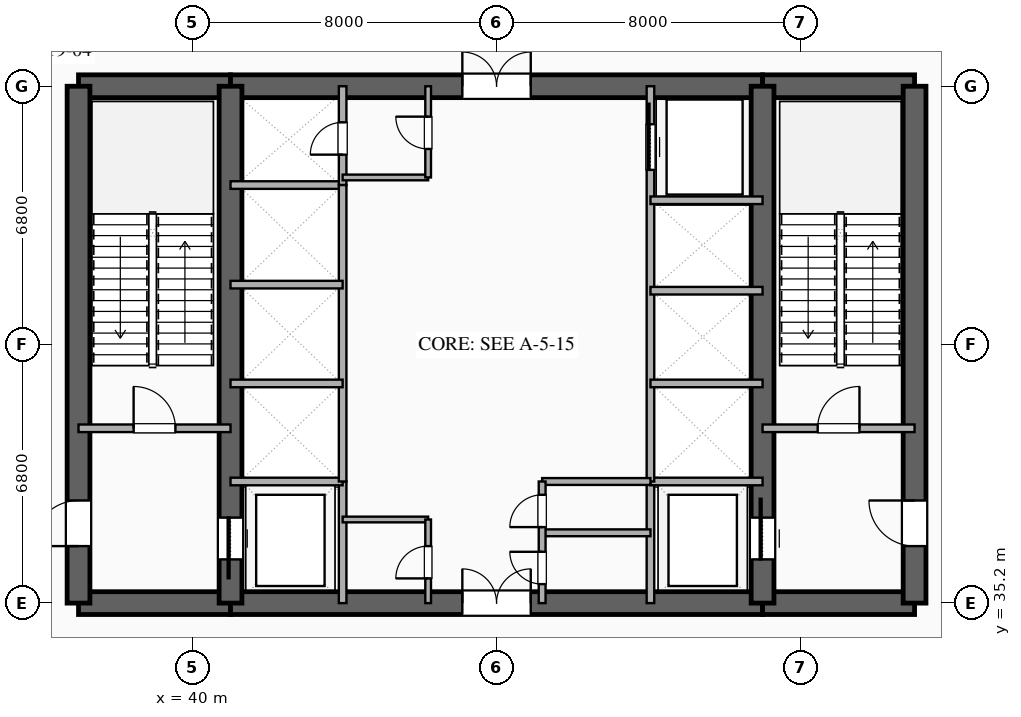
"""IFC4 building model, lengths in metres.
Left out: names, types, materials, properties, quantities, classifications, styles, units other than length and angle.
Written with IfcOpenShell. Run it as: python <this file> out.ifc"""

import sys

from ifc_helpers import new_model, si_unit, direction, frame, frame_2d, origin, place, context, subcontext, project, spatial, rectangle, extrude, element, fill, save


model = new_model("IFC4")
c1 = context("Model", 3, precision=1e-05, world=origin(), true_north=direction((0.0, 1.0)))
c2 = subcontext(c1, "Body", "Model", "MODEL_VIEW")
j1 = project(units=[si_unit("LENGTHUNIT", "METRE"), si_unit("PLANEANGLEUNIT", "RADIAN")], contexts=[c1])
p1 = place(None, origin())
s1 = spatial("IfcSite", under=j1, at=p1, CompositionType="ELEMENT")
p2 = place(p1, origin())
s2 = spatial("IfcBuilding", under=s1, at=p2, CompositionType="ELEMENT")
p3 = place(p2, frame((0.0, 0.0, 78.6)))
s3 = spatial("IfcBuildingStorey", under=s2, at=p3, CompositionType="ELEMENT", Elevation=78.6)
p4 = place(p3, frame((37.0, 35.2, 0.0), z_axis=(0.0, 0.0, 1.0), x_axis=(1.0, 0.0, 0.0)))
e1 = element("IfcWall", 1, at=p4, inside=s3, PredefinedType="SHEAR", context=c2, shape_type="SweptSolid", body=[
    extrude(rectangle(XDim=4.0, YDim=0.6, at=frame_2d((2.0, 0.0))), origin(), (0.0, 0.0, 1.0), 5.15),
])
p5 = place(p3, frame((41.0, 35.2, 0.0), z_axis=(0.0, 0.0, 1.0), x_axis=(1.0, 0.0, 0.0)))
e2 = element("IfcWall", 2, at=p5, inside=s3, PredefinedType="SHEAR", context=c2, shape_type="SweptSolid", body=[
    extrude(rectangle(XDim=14.0, YDim=0.6, at=frame_2d((7.0, 0.0))), origin(), (0.0, 0.0, 1.0), 5.15),
])
p6 = place(p5, frame((6.1, 0.0, 0.0)))
e3 = element("IfcOpeningElement", 3, at=p6, cuts=e2, PredefinedType="OPENING", context=c2, shape_type="SweptSolid", body=[
    extrude(rectangle(XDim=1.8, YDim=2.25, at=frame_2d((0.9, 1.125))), frame((0.0, 0.31, 0.0), z_axis=(0.0, -1.0, 0.0), x_axis=(1.0, 0.0, 0.0)), (0.0, 0.0, 1.0), 0.62),
])
for number, where, z_axis, x_axis in (
    (4, (55.0, 35.2, 0.0), (0.0, 0.0, 1.0), (1.0, 0.0, 0.0)),
    (5, (37.0, 48.8, 0.0), (0.0, 0.0, 1.0), (1.0, 0.0, 0.0)),
):
    element("IfcWall", number, at=place(p3, frame(where, z_axis=z_axis, x_axis=x_axis)), inside=s3, PredefinedType="SHEAR", context=c2, shape_type="SweptSolid", body=[
        extrude(rectangle(XDim=4.0, YDim=0.6, at=frame_2d((2.0, 0.0))), origin(), (0.0, 0.0, 1.0), 5.15),
    ])
p7 = place(p3, frame((41.0, 48.8, 0.0), z_axis=(0.0, 0.0, 1.0), x_axis=(1.0, 0.0, 0.0)))
e6 = element("IfcWall", 6, at=p7, inside=s3, PredefinedType="SHEAR", context=c2, shape_type="SweptSolid", body=[
    extrude(rectangle(XDim=14.0, YDim=0.6, at=frame_2d((7.0, 0.0))), origin(), (0.0, 0.0, 1.0), 5.15),
])
p8 = place(p7, frame((6.1, 0.0, 0.0)))
e7 = element("IfcOpeningElement", 7, at=p8, cuts=e6, PredefinedType="OPENING", context=c2, shape_type="SweptSolid", body=[
    extrude(rectangle(XDim=1.8, YDim=2.25, at=frame_2d((0.9, 1.125))), frame((0.0, 0.31, 0.0), z_axis=(0.0, -1.0, 0.0), x_axis=(1.0, 0.0, 0.0)), (0.0, 0.0, 1.0), 0.62),
])
p9 = place(p3, frame((55.0, 48.8, 0.0), z_axis=(0.0, 0.0, 1.0), x_axis=(1.0, 0.0, 0.0)))
e8 = element("IfcWall", 8, at=p9, inside=s3, PredefinedType="SHEAR", context=c2, shape_type="SweptSolid", body=[
    extrude(rectangle(XDim=4.0, YDim=0.6, at=frame_2d((2.0, 0.0))), origin(), (0.0, 0.0, 1.0), 5.15),
])
p10 = place(p3, frame((37.0, 35.2, 0.0), z_axis=(0.0, 0.0, 1.0), x_axis=(0.0, 1.0, 0.0)))
e9 = element("IfcWall", 9, at=p10, inside=s3, PredefinedType="SHEAR", context=c2, shape_type="SweptSolid", body=[
    extrude(rectangle(XDim=13.6, YDim=0.6, at=frame_2d((6.8, 0.0))), origin(), (0.0, 0.0, 1.0), 5.15),
])
p11 = place(p10, frame((1.5, 0.0, 0.0)))
e10 = element("IfcOpeningElement", 10, at=p11, cuts=e9, PredefinedType="OPENING", context=c2, shape_type="SweptSolid", body=[
    extrude(rectangle(XDim=1.2, YDim=2.15, at=frame_2d((0.6, 1.075))), frame((0.0, 0.31, 0.0), z_axis=(0.0, -1.0, 0.0), x_axis=(1.0, 0.0, 0.0)), (0.0, 0.0, 1.0), 0.62),
])
p12 = place(p3, frame((59.0, 35.2, 0.0), z_axis=(0.0, 0.0, 1.0), x_axis=(0.0, 1.0, 0.0)))
e11 = element("IfcWall", 11, at=p12, inside=s3, PredefinedType="SHEAR", context=c2, shape_type="SweptSolid", body=[
    extrude(rectangle(XDim=13.6, YDim=0.6, at=frame_2d((6.8, 0.0))), origin(), (0.0, 0.0, 1.0), 5.15),
])
p13 = place(p12, frame((1.5, 0.0, 0.0)))
e12 = element("IfcOpeningElement", 12, at=p13, cuts=e11, PredefinedType="OPENING", context=c2, shape_type="SweptSolid", body=[
    extrude(rectangle(XDim=1.2, YDim=2.15, at=frame_2d((0.6, 1.075))), frame((0.0, 0.31, 0.0), z_axis=(0.0, -1.0, 0.0), x_axis=(1.0, 0.0, 0.0)), (0.0, 0.0, 1.0), 0.62),
])
p14 = place(p3, frame((41.0, 35.2, 0.0), z_axis=(0.0, 0.0, 1.0), x_axis=(0.0, 1.0, 0.0)))
e13 = element("IfcWall", 13, at=p14, inside=s3, PredefinedType="SHEAR", context=c2, shape_type="SweptSolid", body=[
    extrude(rectangle(XDim=13.6, YDim=0.6, at=frame_2d((6.8, 0.0))), origin(), (0.0, 0.0, 1.0), 5.15),
])
p15 = place(p14, frame((1.15, 0.0, 0.0)))
e14 = element("IfcOpeningElement", 14, at=p15, cuts=e13, PredefinedType="OPENING", context=c2, shape_type="SweptSolid", body=[
    extrude(rectangle(XDim=1.1, YDim=2.2, at=frame_2d((0.55, 1.1))), frame((0.0, 0.31, 0.0), z_axis=(0.0, -1.0, 0.0), x_axis=(1.0, 0.0, 0.0)), (0.0, 0.0, 1.0), 0.62),
])
p16 = place(p3, frame((55.0, 35.2, 0.0), z_axis=(0.0, 0.0, 1.0), x_axis=(0.0, 1.0, 0.0)))
e15 = element("IfcWall", 15, at=p16, inside=s3, PredefinedType="SHEAR", context=c2, shape_type="SweptSolid", body=[
    extrude(rectangle(XDim=13.6, YDim=0.6, at=frame_2d((6.8, 0.0))), origin(), (0.0, 0.0, 1.0), 5.15),
])
p17 = place(p16, frame((1.15, 0.0, 0.0)))
e16 = element("IfcOpeningElement", 16, at=p17, cuts=e15, PredefinedType="OPENING", context=c2, shape_type="SweptSolid", body=[
    extrude(rectangle(XDim=1.1, YDim=2.2, at=frame_2d((0.55, 1.1))), frame((0.0, 0.31, 0.0), z_axis=(0.0, -1.0, 0.0), x_axis=(1.0, 0.0, 0.0)), (0.0, 0.0, 1.0), 0.62),
])
p18 = place(p3, frame((37.0, 39.8, 0.0), z_axis=(0.0, 0.0, 1.0), x_axis=(1.0, 0.0, 0.0)))
e17 = element("IfcWall", 17, at=p18, inside=s3, PredefinedType="SOLIDWALL", context=c2, shape_type="SweptSolid", body=[
    extrude(rectangle(XDim=4.0, YDim=0.2, at=frame_2d((2.0, 0.0))), origin(), (0.0, 0.0, 1.0), 3.45),
])
p19 = place(p18, frame((1.45, 0.0, 0.0)))
e18 = element("IfcOpeningElement", 18, at=p19, cuts=e17, PredefinedType="OPENING", context=c2, shape_type="SweptSolid", body=[
    extrude(rectangle(XDim=1.1, YDim=2.15, at=frame_2d((0.55, 1.075))), frame((0.0, 0.11, 0.0), z_axis=(0.0, -1.0, 0.0), x_axis=(1.0, 0.0, 0.0)), (0.0, 0.0, 1.0), 0.22),
])
p20 = place(p3, frame((55.0, 39.8, 0.0), z_axis=(0.0, 0.0, 1.0), x_axis=(1.0, 0.0, 0.0)))
e19 = element("IfcWall", 19, at=p20, inside=s3, PredefinedType="SOLIDWALL", context=c2, shape_type="SweptSolid", body=[
    extrude(rectangle(XDim=4.0, YDim=0.2, at=frame_2d((2.0, 0.0))), origin(), (0.0, 0.0, 1.0), 3.45),
])
p21 = place(p20, frame((1.45, 0.0, 0.0)))
e20 = element("IfcOpeningElement", 20, at=p21, cuts=e19, PredefinedType="OPENING", context=c2, shape_type="SweptSolid", body=[
    extrude(rectangle(XDim=1.1, YDim=2.15, at=frame_2d((0.55, 1.075))), frame((0.0, 0.11, 0.0), z_axis=(0.0, -1.0, 0.0), x_axis=(1.0, 0.0, 0.0)), (0.0, 0.0, 1.0), 0.22),
])
p22 = place(p3, frame((43.95, 35.2, 0.0), z_axis=(0.0, 0.0, 1.0), x_axis=(0.0, 1.0, 0.0)))
e21 = element("IfcWall", 21, at=p22, inside=s3, PredefinedType="SOLIDWALL", context=c2, shape_type="SweptSolid", body=[
    extrude(rectangle(XDim=3.2, YDim=0.2, at=frame_2d((1.6, 0.0))), origin(), (0.0, 0.0, 1.0), 3.45),
])
p23 = place(p3, frame((41.0, 38.4, 0.0), z_axis=(0.0, 0.0, 1.0), x_axis=(1.0, 0.0, 0.0)))
e22 = element("IfcWall", 22, at=p23, inside=s3, PredefinedType="SOLIDWALL", context=c2, shape_type="SweptSolid", body=[
    extrude(rectangle(XDim=2.95, YDim=0.2, at=frame_2d((1.475, 0.0))), origin(), (0.0, 0.0, 1.0), 3.45),
])
p24 = place(p3, frame((52.05, 35.2, 0.0), z_axis=(0.0, 0.0, 1.0), x_axis=(0.0, 1.0, 0.0)))
e23 = element("IfcWall", 23, at=p24, inside=s3, PredefinedType="SOLIDWALL", context=c2, shape_type="SweptSolid", body=[
    extrude(rectangle(XDim=3.2, YDim=0.2, at=frame_2d((1.6, 0.0))), origin(), (0.0, 0.0, 1.0), 3.45),
])
for number, where, z_axis, x_axis in (
    (24, (52.05, 38.4, 0.0), (0.0, 0.0, 1.0), (1.0, 0.0, 0.0)),
    (25, (41.0, 46.2, 0.0), (0.0, 0.0, 1.0), (1.0, 0.0, 0.0)),
):
    element("IfcWall", number, at=place(p3, frame(where, z_axis=z_axis, x_axis=x_axis)), inside=s3, PredefinedType="SOLIDWALL", context=c2, shape_type="SweptSolid", body=[
        extrude(rectangle(XDim=2.95, YDim=0.2, at=frame_2d((1.475, 0.0))), origin(), (0.0, 0.0, 1.0), 3.45),
    ])
p25 = place(p3, frame((43.95, 46.2, 0.0), z_axis=(0.0, 0.0, 1.0), x_axis=(0.0, 1.0, 0.0)))
e26 = element("IfcWall", 26, at=p25, inside=s3, PredefinedType="SOLIDWALL", context=c2, shape_type="SweptSolid", body=[
    extrude(rectangle(XDim=2.6, YDim=0.2, at=frame_2d((1.3, 0.0))), origin(), (0.0, 0.0, 1.0), 3.45),
])
p26 = place(p25, frame((0.8, 0.0, 0.0)))
e27 = element("IfcOpeningElement", 27, at=p26, cuts=e26, PredefinedType="OPENING", context=c2, shape_type="SweptSolid", body=[
    extrude(rectangle(XDim=0.85, YDim=2.15, at=frame_2d((0.425, 1.075))), frame((0.0, 0.11, 0.0), z_axis=(0.0, -1.0, 0.0), x_axis=(1.0, 0.0, 0.0)), (0.0, 0.0, 1.0), 0.22),
])
p27 = place(p3, frame((43.95, 38.4, 0.0), z_axis=(0.0, 0.0, 1.0), x_axis=(0.0, 1.0, 0.0)))
e28 = element("IfcWall", 28, at=p27, inside=s3, PredefinedType="SOLIDWALL", context=c2, shape_type="SweptSolid", body=[
    extrude(rectangle(XDim=7.8, YDim=0.2, at=frame_2d((3.9, 0.0))), origin(), (0.0, 0.0, 1.0), 3.45),
])
for number, where, z_axis, x_axis in (
    (29, (41.0, 40.98, 0.0), (0.0, 0.0, 1.0), (1.0, 0.0, 0.0)),
    (30, (41.0, 43.58, 0.0), (0.0, 0.0, 1.0), (1.0, 0.0, 0.0)),
):
    element("IfcWall", number, at=place(p3, frame(where, z_axis=z_axis, x_axis=x_axis)), inside=s3, PredefinedType="SOLIDWALL", context=c2, shape_type="SweptSolid", body=[
        extrude(rectangle(XDim=2.95, YDim=0.2, at=frame_2d((1.475, 0.0))), origin(), (0.0, 0.0, 1.0), 3.45),
    ])
p28 = place(p3, frame((52.05, 38.4, 0.0), z_axis=(0.0, 0.0, 1.0), x_axis=(0.0, 1.0, 0.0)))
e31 = element("IfcWall", 31, at=p28, inside=s3, PredefinedType="SOLIDWALL", context=c2, shape_type="SweptSolid", body=[
    extrude(rectangle(XDim=10.4, YDim=0.2, at=frame_2d((5.2, 0.0))), origin(), (0.0, 0.0, 1.0), 3.45),
])
p29 = place(p28, frame((8.2, 0.0, 0.0)))
e32 = element("IfcOpeningElement", 32, at=p29, cuts=e31, PredefinedType="OPENING", context=c2, shape_type="SweptSolid", body=[
    extrude(rectangle(XDim=1.2, YDim=2.2, at=frame_2d((0.6, 1.1))), frame((0.0, 0.11, 0.0), z_axis=(0.0, -1.0, 0.0), x_axis=(1.0, 0.0, 0.0)), (0.0, 0.0, 1.0), 0.22),
])
for number, where, z_axis, x_axis in (
    (33, (52.05, 40.98, 0.0), (0.0, 0.0, 1.0), (1.0, 0.0, 0.0)),
    (34, (52.05, 43.42, 0.0), (0.0, 0.0, 1.0), (1.0, 0.0, 0.0)),
    (35, (52.05, 45.8, 0.0), (0.0, 0.0, 1.0), (1.0, 0.0, 0.0)),
):
    element("IfcWall", number, at=place(p3, frame(where, z_axis=z_axis, x_axis=x_axis)), inside=s3, PredefinedType="SOLIDWALL", context=c2, shape_type="SweptSolid", body=[
        extrude(rectangle(XDim=2.95, YDim=0.2, at=frame_2d((1.475, 0.0))), origin(), (0.0, 0.0, 1.0), 3.45),
    ])
p30 = place(p3, frame((43.95, 37.4, 0.0), z_axis=(0.0, 0.0, 1.0), x_axis=(1.0, 0.0, 0.0)))
e36 = element("IfcWall", 36, at=p30, inside=s3, PredefinedType="PARTITIONING", context=c2, shape_type="SweptSolid", body=[
    extrude(rectangle(XDim=2.25, YDim=0.15, at=frame_2d((1.125, 0.0))), origin(), (0.0, 0.0, 1.0), 3.45),
])
p31 = place(p3, frame((46.2, 35.2, 0.0), z_axis=(0.0, 0.0, 1.0), x_axis=(0.0, 1.0, 0.0)))
e37 = element("IfcWall", 37, at=p31, inside=s3, PredefinedType="PARTITIONING", context=c2, shape_type="SweptSolid", body=[
    extrude(rectangle(XDim=2.2, YDim=0.15, at=frame_2d((1.1, 0.0))), origin(), (0.0, 0.0, 1.0), 3.45),
])
p32 = place(p31, frame((0.65, 0.0, 0.0)))
e38 = element("IfcOpeningElement", 38, at=p32, cuts=e37, PredefinedType="OPENING", context=c2, shape_type="SweptSolid", body=[
    extrude(rectangle(XDim=0.85, YDim=2.15, at=frame_2d((0.425, 1.075))), frame((0.0, 0.085, 0.0), z_axis=(0.0, -1.0, 0.0), x_axis=(1.0, 0.0, 0.0)), (0.0, 0.0, 1.0), 0.17),
])
p33 = place(p3, frame((43.95, 46.4, 0.0), z_axis=(0.0, 0.0, 1.0), x_axis=(1.0, 0.0, 0.0)))
e39 = element("IfcWall", 39, at=p33, inside=s3, PredefinedType="PARTITIONING", context=c2, shape_type="SweptSolid", body=[
    extrude(rectangle(XDim=2.25, YDim=0.15, at=frame_2d((1.125, 0.0))), origin(), (0.0, 0.0, 1.0), 3.45),
])
p34 = place(p3, frame((46.2, 46.4, 0.0), z_axis=(0.0, 0.0, 1.0), x_axis=(0.0, 1.0, 0.0)))
e40 = element("IfcWall", 40, at=p34, inside=s3, PredefinedType="PARTITIONING", context=c2, shape_type="SweptSolid", body=[
    extrude(rectangle(XDim=2.4, YDim=0.15, at=frame_2d((1.2, 0.0))), origin(), (0.0, 0.0, 1.0), 3.45),
])
p35 = place(p34, frame((0.75, 0.0, 0.0)))
e41 = element("IfcOpeningElement", 41, at=p35, cuts=e40, PredefinedType="OPENING", context=c2, shape_type="SweptSolid", body=[
    extrude(rectangle(XDim=0.85, YDim=2.15, at=frame_2d((0.425, 1.075))), frame((0.0, 0.085, 0.0), z_axis=(0.0, -1.0, 0.0), x_axis=(1.0, 0.0, 0.0)), (0.0, 0.0, 1.0), 0.17),
])
for number, where, z_axis, x_axis in (
    (42, (49.2, 37.05, 0.0), (0.0, 0.0, 1.0), (1.0, 0.0, 0.0)),
    (43, (49.2, 38.4, 0.0), (0.0, 0.0, 1.0), (1.0, 0.0, 0.0)),
):
    element("IfcWall", number, at=place(p3, frame(where, z_axis=z_axis, x_axis=x_axis)), inside=s3, PredefinedType="PLUMBINGWALL", context=c2, shape_type="SweptSolid", body=[
        extrude(rectangle(XDim=2.85, YDim=0.18, at=frame_2d((1.425, 0.0))), origin(), (0.0, 0.0, 1.0), 3.45),
    ])
p36 = place(p3, frame((49.2, 35.2, 0.0), z_axis=(0.0, 0.0, 1.0), x_axis=(0.0, 1.0, 0.0)))
e44 = element("IfcWall", 44, at=p36, inside=s3, PredefinedType="PLUMBINGWALL", context=c2, shape_type="SweptSolid", body=[
    extrude(rectangle(XDim=3.2, YDim=0.18, at=frame_2d((1.6, 0.0))), origin(), (0.0, 0.0, 1.0), 3.45),
])
p37 = place(p36, frame((0.5, 0.0, 0.0)))
e45 = element("IfcOpeningElement", 45, at=p37, cuts=e44, PredefinedType="OPENING", context=c2, shape_type="SweptSolid", body=[
    extrude(rectangle(XDim=0.85, YDim=2.1, at=frame_2d((0.425, 1.05))), frame((0.0, 0.1, 0.0), z_axis=(0.0, -1.0, 0.0), x_axis=(1.0, 0.0, 0.0)), (0.0, 0.0, 1.0), 0.2),
])
p38 = place(p36, frame((2.0, 0.0, 0.0)))
e46 = element("IfcOpeningElement", 46, at=p38, cuts=e44, PredefinedType="OPENING", context=c2, shape_type="SweptSolid", body=[
    extrude(rectangle(XDim=0.85, YDim=2.15, at=frame_2d((0.425, 1.075))), frame((0.0, 0.1, 0.0), z_axis=(0.0, -1.0, 0.0), x_axis=(1.0, 0.0, 0.0)), (0.0, 0.0, 1.0), 0.2),
])
p39 = place(p15, origin())
e47 = element("IfcDoor", 47, at=p39, inside=s3, OperationType="SLIDING_TO_LEFT", PredefinedType="DOOR", context=c2, shape_type="SweptSolid", body=[
    extrude(rectangle(XDim=1.1, YDim=2.2, at=frame_2d((0.55, 1.1))), frame((0.0, 0.025, 0.0), z_axis=(0.0, -1.0, 0.0), x_axis=(1.0, 0.0, 0.0)), (0.0, 0.0, 1.0), 0.05),
])
fill(e14, e47)
p40 = place(p17, origin())
e48 = element("IfcDoor", 48, at=p40, inside=s3, OperationType="SLIDING_TO_RIGHT", PredefinedType="DOOR", context=c2, shape_type="SweptSolid", body=[
    extrude(rectangle(XDim=1.1, YDim=2.2, at=frame_2d((0.55, 1.1))), frame((0.0, 0.025, 0.0), z_axis=(0.0, -1.0, 0.0), x_axis=(1.0, 0.0, 0.0)), (0.0, 0.0, 1.0), 0.05),
])
fill(e16, e48)
p41 = place(p11, origin())
e49 = element("IfcDoor", 49, at=p41, inside=s3, OperationType="SINGLE_SWING_LEFT", PredefinedType="DOOR", context=c2, shape_type="SweptSolid", body=[
    extrude(rectangle(XDim=1.2, YDim=2.15, at=frame_2d((0.6, 1.075))), frame((0.0, 0.025, 0.0), z_axis=(0.0, -1.0, 0.0), x_axis=(1.0, 0.0, 0.0)), (0.0, 0.0, 1.0), 0.05),
])
fill(e10, e49)
p42 = place(p13, origin())
e50 = element("IfcDoor", 50, at=p42, inside=s3, OperationType="SINGLE_SWING_RIGHT", PredefinedType="DOOR", context=c2, shape_type="SweptSolid", body=[
    extrude(rectangle(XDim=1.2, YDim=2.15, at=frame_2d((0.6, 1.075))), frame((0.0, 0.025, 0.0), z_axis=(0.0, -1.0, 0.0), x_axis=(1.0, 0.0, 0.0)), (0.0, 0.0, 1.0), 0.05),
])
fill(e12, e50)
p43 = place(p6, origin())
e51 = element("IfcDoor", 51, at=p43, inside=s3, OperationType="DOUBLE_DOOR_SINGLE_SWING", PredefinedType="DOOR", context=c2, shape_type="SweptSolid", body=[
    extrude(rectangle(XDim=1.8, YDim=2.25, at=frame_2d((0.9, 1.125))), frame((0.0, 0.025, 0.0), z_axis=(0.0, -1.0, 0.0), x_axis=(1.0, 0.0, 0.0)), (0.0, 0.0, 1.0), 0.05),
])
fill(e3, e51)
p44 = place(p8, origin())
e52 = element("IfcDoor", 52, at=p44, inside=s3, OperationType="DOUBLE_DOOR_SINGLE_SWING", PredefinedType="DOOR", context=c2, shape_type="SweptSolid", body=[
    extrude(rectangle(XDim=1.8, YDim=2.25, at=frame_2d((0.9, 1.125))), frame((0.0, 0.025, 0.0), z_axis=(0.0, -1.0, 0.0), x_axis=(1.0, 0.0, 0.0)), (0.0, 0.0, 1.0), 0.05),
])
fill(e7, e52)
p45 = place(p19, origin())
e53 = element("IfcDoor", 53, at=p45, inside=s3, OperationType="SINGLE_SWING_LEFT", PredefinedType="DOOR", context=c2, shape_type="SweptSolid", body=[
    extrude(rectangle(XDim=1.1, YDim=2.15, at=frame_2d((0.55, 1.075))), frame((0.0, 0.025, 0.0), z_axis=(0.0, -1.0, 0.0), x_axis=(1.0, 0.0, 0.0)), (0.0, 0.0, 1.0), 0.05),
])
fill(e18, e53)
p46 = place(p21, origin())
e54 = element("IfcDoor", 54, at=p46, inside=s3, OperationType="SINGLE_SWING_RIGHT", PredefinedType="DOOR", context=c2, shape_type="SweptSolid", body=[
    extrude(rectangle(XDim=1.1, YDim=2.15, at=frame_2d((0.55, 1.075))), frame((0.0, 0.025, 0.0), z_axis=(0.0, -1.0, 0.0), x_axis=(1.0, 0.0, 0.0)), (0.0, 0.0, 1.0), 0.05),
])
fill(e20, e54)
p47 = place(p26, origin())
e55 = element("IfcDoor", 55, at=p47, inside=s3, OperationType="SINGLE_SWING_LEFT", PredefinedType="DOOR", context=c2, shape_type="SweptSolid", body=[
    extrude(rectangle(XDim=0.85, YDim=2.15, at=frame_2d((0.425, 1.075))), frame((0.0, 0.025, 0.0), z_axis=(0.0, -1.0, 0.0), x_axis=(1.0, 0.0, 0.0)), (0.0, 0.0, 1.0), 0.05),
])
fill(e27, e55)
p48 = place(p29, origin())
e56 = element("IfcDoor", 56, at=p48, inside=s3, OperationType="SLIDING_TO_RIGHT", PredefinedType="DOOR", context=c2, shape_type="SweptSolid", body=[
    extrude(rectangle(XDim=1.2, YDim=2.2, at=frame_2d((0.6, 1.1))), frame((0.0, 0.025, 0.0), z_axis=(0.0, -1.0, 0.0), x_axis=(1.0, 0.0, 0.0)), (0.0, 0.0, 1.0), 0.05),
])
fill(e32, e56)
p49 = place(p32, origin())
e57 = element("IfcDoor", 57, at=p49, inside=s3, OperationType="SINGLE_SWING_LEFT", PredefinedType="DOOR", context=c2, shape_type="SweptSolid", body=[
    extrude(rectangle(XDim=0.85, YDim=2.15, at=frame_2d((0.425, 1.075))), frame((0.0, 0.025, 0.0), z_axis=(0.0, -1.0, 0.0), x_axis=(1.0, 0.0, 0.0)), (0.0, 0.0, 1.0), 0.05),
])
fill(e38, e57)
p50 = place(p35, origin())
e58 = element("IfcDoor", 58, at=p50, inside=s3, OperationType="SINGLE_SWING_RIGHT", PredefinedType="DOOR", context=c2, shape_type="SweptSolid", body=[
    extrude(rectangle(XDim=0.85, YDim=2.15, at=frame_2d((0.425, 1.075))), frame((0.0, 0.025, 0.0), z_axis=(0.0, -1.0, 0.0), x_axis=(1.0, 0.0, 0.0)), (0.0, 0.0, 1.0), 0.05),
])
fill(e41, e58)
p51 = place(p37, origin())
e59 = element("IfcDoor", 59, at=p51, inside=s3, OperationType="SINGLE_SWING_RIGHT", PredefinedType="DOOR", context=c2, shape_type="SweptSolid", body=[
    extrude(rectangle(XDim=0.85, YDim=2.1, at=frame_2d((0.425, 1.05))), frame((0.0, 0.025, 0.0), z_axis=(0.0, -1.0, 0.0), x_axis=(1.0, 0.0, 0.0)), (0.0, 0.0, 1.0), 0.05),
])
fill(e45, e59)
p52 = place(p38, origin())
e60 = element("IfcDoor", 60, at=p52, inside=s3, OperationType="SINGLE_SWING_LEFT", PredefinedType="DOOR", context=c2, shape_type="SweptSolid", body=[
    extrude(rectangle(XDim=0.85, YDim=2.15, at=frame_2d((0.425, 1.075))), frame((0.0, 0.025, 0.0), z_axis=(0.0, -1.0, 0.0), x_axis=(1.0, 0.0, 0.0)), (0.0, 0.0, 1.0), 0.05),
])
fill(e46, e60)
save(model, sys.argv[1])
